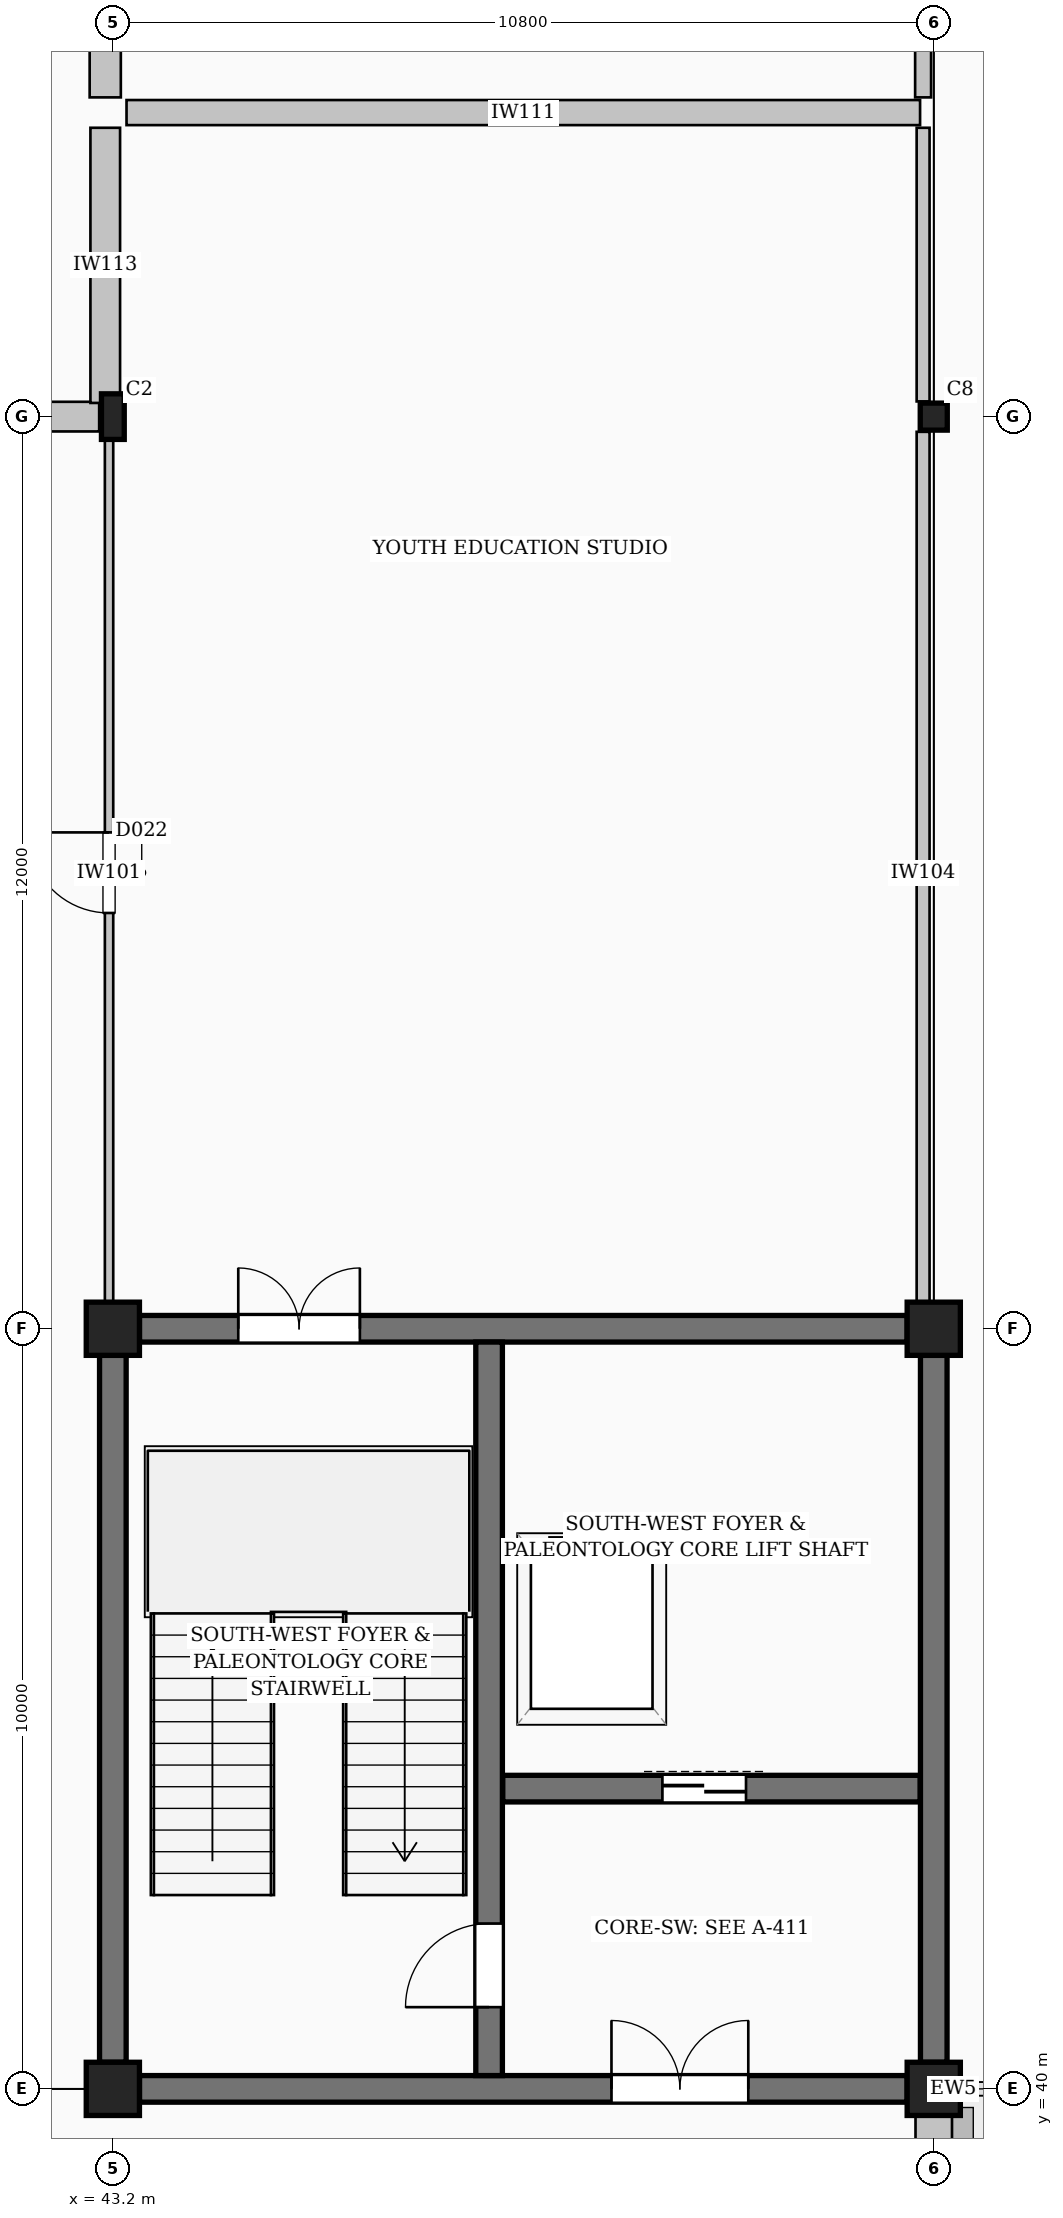
"""IFC4 building model, lengths in metres.
Left out: names, types, materials, properties, quantities, classifications, styles, units other than length and angle.
Written with IfcOpenShell. Run it as: python <this file> out.ifc"""

import sys

from ifc_helpers import new_model, si_unit, direction, frame, frame_2d, origin, origin_2d, place, context, subcontext, project, spatial, rectangle, hollow_circle, i_section, extrude, element, fill, save


model = new_model("IFC4")
c1 = context("Model", 3, precision=1e-05, world=origin(), true_north=direction((0.0, 1.0)))
c2 = subcontext(c1, "Body", "Model", "MODEL_VIEW")
j1 = project(units=[si_unit("LENGTHUNIT", "METRE"), si_unit("PLANEANGLEUNIT", "RADIAN")], contexts=[c1])
p1 = place(None, origin())
s1 = spatial("IfcSite", under=j1, at=p1, CompositionType="ELEMENT")
p2 = place(p1, origin())
s2 = spatial("IfcBuilding", under=s1, at=p2, CompositionType="ELEMENT")
p3 = place(p2, origin())
s3 = spatial("IfcBuildingStorey", under=s2, at=p3, CompositionType="ELEMENT", Elevation=0.0)
for number, where, z_axis, x_axis in (
    (1, (43.2, 40.0, 0.0), (0.0, 0.0, 1.0), (1.0, 0.0, 0.0)),
    (2, (43.2, 50.0, 0.0), (0.0, 0.0, 1.0), (1.0, 0.0, 0.0)),
):
    element("IfcColumn", number, at=place(p3, frame(where, z_axis=z_axis, x_axis=x_axis)), inside=s3, PredefinedType="COLUMN", context=c2, shape_type="SweptSolid", body=[
        extrude(rectangle(XDim=0.7, YDim=0.7, at=origin_2d()), origin(), (0.0, 0.0, 1.0), 4.8),
    ])
p4 = place(p3, frame((43.2, 62.0, 0.0), z_axis=(0.0, 0.0, 1.0), x_axis=(1.0, 0.0, 0.0)))
e3 = element("IfcColumn", 3, at=p4, inside=s3, PredefinedType="COLUMN", context=c2, shape_type="SweptSolid", body=[
    extrude(i_section(OverallWidth=0.3, OverallDepth=0.6, WebThickness=0.015, FlangeThickness=0.03, FilletRadius=0.027, at=origin_2d()), origin(), (0.0, 0.0, 1.0), 4.8),
])
for number, where, z_axis, x_axis in (
    (4, (54.0, 40.0, 0.0), (0.0, 0.0, 1.0), (1.0, 0.0, 0.0)),
    (5, (54.0, 50.0, 0.0), (0.0, 0.0, 1.0), (1.0, 0.0, 0.0)),
):
    element("IfcColumn", number, at=place(p3, frame(where, z_axis=z_axis, x_axis=x_axis)), inside=s3, PredefinedType="COLUMN", context=c2, shape_type="SweptSolid", body=[
        extrude(rectangle(XDim=0.7, YDim=0.7, at=origin_2d()), origin(), (0.0, 0.0, 1.0), 4.8),
    ])
p5 = place(p3, frame((54.0, 62.0, 0.0), z_axis=(0.0, 0.0, 1.0), x_axis=(1.0, 0.0, 0.0)))
e6 = element("IfcColumn", 6, at=p5, inside=s3, PredefinedType="COLUMN", context=c2, shape_type="SweptSolid", body=[
    extrude(hollow_circle(Radius=0.178, WallThickness=0.016, at=origin_2d()), origin(), (0.0, 0.0, 1.0), 4.8),
])
p6 = place(p3, frame((54.0, 30.145, 0.0), z_axis=(0.0, 0.0, 1.0), x_axis=(0.0, 1.0, 0.0)))
e7 = element("IfcWall", 7, at=p6, inside=s3, PredefinedType="STANDARD", context=c2, shape_type="SweptSolid", body=[
    extrude(rectangle(XDim=9.71, YDim=0.48, at=frame_2d((4.855, 0.0))), origin(), (0.0, 0.0, 1.0), 4.56),
])
p7 = place(p6, frame((2.755, 0.0, 0.9)))
e8 = element("IfcOpeningElement", 8, at=p7, cuts=e7, PredefinedType="OPENING", context=c2, shape_type="SweptSolid", body=[
    extrude(rectangle(XDim=4.2, YDim=2.7, at=frame_2d((2.1, 1.35))), frame((0.0, 0.25, 0.0), z_axis=(0.0, -1.0, 0.0), x_axis=(1.0, 0.0, 0.0)), (0.0, 0.0, 1.0), 0.5),
])
p8 = place(p3, frame((54.145, 40.0, 0.0), z_axis=(0.0, 0.0, 1.0), x_axis=(1.0, 0.0, 0.0)))
e9 = element("IfcWall", 9, at=p8, inside=s3, PredefinedType="STANDARD", context=c2, shape_type="SweptSolid", body=[
    extrude(rectangle(XDim=0.225, YDim=0.3, at=frame_2d((0.113, 0.0))), origin(), (0.0, 0.0, 1.0), 4.56),
])
p9 = place(p3, frame((43.55, 40.0, 0.0), z_axis=(0.0, 0.0, 1.0), x_axis=(1.0, 0.0, 0.0)))
e10 = element("IfcWall", 10, at=p9, inside=s3, PredefinedType="SHEAR", context=c2, shape_type="SweptSolid", body=[
    extrude(rectangle(XDim=10.1, YDim=0.35, at=frame_2d((5.05, 0.0))), origin(), (0.0, 0.0, 1.0), 4.56),
])
p10 = place(p9, frame((6.21, 0.0, 0.0)))
e11 = element("IfcOpeningElement", 11, at=p10, cuts=e10, PredefinedType="OPENING", context=c2, shape_type="SweptSolid", body=[
    extrude(rectangle(XDim=1.8, YDim=2.25, at=frame_2d((0.9, 1.125))), frame((0.0, 0.185, 0.0), z_axis=(0.0, -1.0, 0.0), x_axis=(1.0, 0.0, 0.0)), (0.0, 0.0, 1.0), 0.37),
])
p11 = place(p3, frame((43.55, 50.0, 0.0), z_axis=(0.0, 0.0, 1.0), x_axis=(1.0, 0.0, 0.0)))
e12 = element("IfcWall", 12, at=p11, inside=s3, PredefinedType="SHEAR", context=c2, shape_type="SweptSolid", body=[
    extrude(rectangle(XDim=10.1, YDim=0.35, at=frame_2d((5.05, 0.0))), origin(), (0.0, 0.0, 1.0), 4.56),
])
p12 = place(p11, frame((1.3, 0.0, 0.0)))
e13 = element("IfcOpeningElement", 13, at=p12, cuts=e12, PredefinedType="OPENING", context=c2, shape_type="SweptSolid", body=[
    extrude(rectangle(XDim=1.6, YDim=2.2, at=frame_2d((0.8, 1.1))), frame((0.0, 0.185, 0.0), z_axis=(0.0, -1.0, 0.0), x_axis=(1.0, 0.0, 0.0)), (0.0, 0.0, 1.0), 0.37),
])
for number, where, z_axis, x_axis in (
    (14, (43.2, 40.35, 0.0), (0.0, 0.0, 1.0), (0.0, 1.0, 0.0)),
    (15, (54.0, 40.35, 0.0), (0.0, 0.0, 1.0), (0.0, 1.0, 0.0)),
):
    element("IfcWall", number, at=place(p3, frame(where, z_axis=z_axis, x_axis=x_axis)), inside=s3, PredefinedType="SHEAR", context=c2, shape_type="SweptSolid", body=[
        extrude(rectangle(XDim=9.3, YDim=0.35, at=frame_2d((4.65, 0.0))), origin(), (0.0, 0.0, 1.0), 4.56),
    ])
p13 = place(p3, frame((48.15, 40.175, 0.0), z_axis=(0.0, 0.0, 1.0), x_axis=(0.0, 1.0, 0.0)))
e16 = element("IfcWall", 16, at=p13, inside=s3, PredefinedType="SHEAR", context=c2, shape_type="SweptSolid", body=[
    extrude(rectangle(XDim=9.65, YDim=0.35, at=frame_2d((4.825, 0.0))), origin(), (0.0, 0.0, 1.0), 4.56),
])
p14 = place(p13, frame((0.9, 0.0, 0.0)))
e17 = element("IfcOpeningElement", 17, at=p14, cuts=e16, PredefinedType="OPENING", context=c2, shape_type="SweptSolid", body=[
    extrude(rectangle(XDim=1.1, YDim=2.2, at=frame_2d((0.55, 1.1))), frame((0.0, 0.185, 0.0), z_axis=(0.0, -1.0, 0.0), x_axis=(1.0, 0.0, 0.0)), (0.0, 0.0, 1.0), 0.37),
])
p15 = place(p3, frame((48.33, 43.95, 0.0), z_axis=(0.0, 0.0, 1.0), x_axis=(1.0, 0.0, 0.0)))
e18 = element("IfcWall", 18, at=p15, inside=s3, PredefinedType="SHEAR", context=c2, shape_type="SweptSolid", body=[
    extrude(rectangle(XDim=5.49, YDim=0.35, at=frame_2d((2.745, 0.0))), origin(), (0.0, 0.0, 1.0), 4.56),
])
p16 = place(p15, frame((2.1, 0.0, 0.0)))
e19 = element("IfcOpeningElement", 19, at=p16, cuts=e18, PredefinedType="OPENING", context=c2, shape_type="SweptSolid", body=[
    extrude(rectangle(XDim=1.1, YDim=2.2, at=frame_2d((0.55, 1.1))), frame((0.0, 0.185, 0.0), z_axis=(0.0, -1.0, 0.0), x_axis=(1.0, 0.0, 0.0)), (0.0, 0.0, 1.0), 0.37),
])
p17 = place(p3, frame((38.2, 62.0, 0.0), z_axis=(0.0, 0.0, 1.0), x_axis=(1.0, 0.0, 0.0)))
e20 = element("IfcWall", 20, at=p17, inside=s3, PredefinedType="PARTITIONING", context=c2, shape_type="SweptSolid", body=[
    extrude(rectangle(XDim=4.82, YDim=0.39, at=frame_2d((2.41, 0.0))), origin(), (0.0, 0.0, 1.0), 4.049),
])
p18 = place(p17, frame((1.685, 0.0, 0.0)))
e21 = element("IfcOpeningElement", 21, at=p18, cuts=e20, PredefinedType="OPENING", context=c2, shape_type="SweptSolid", body=[
    extrude(rectangle(XDim=1.45, YDim=2.35, at=frame_2d((0.725, 1.175))), frame((0.0, 0.205, 0.0), z_axis=(0.0, -1.0, 0.0), x_axis=(1.0, 0.0, 0.0)), (0.0, 0.0, 1.0), 0.41),
])
p19 = place(p3, frame((43.15, 50.18, 0.0), z_axis=(0.0, 0.0, 1.0), x_axis=(0.0, 1.0, 0.0)))
e22 = element("IfcWall", 22, at=p19, inside=s3, PredefinedType="PARTITIONING", context=c2, shape_type="SweptSolid", body=[
    extrude(rectangle(XDim=11.64, YDim=0.11, at=frame_2d((5.82, 0.0))), origin(), (0.0, 0.0, 1.0), 3.939),
])
p20 = place(p19, frame((5.29, 0.0, 0.0)))
e23 = element("IfcOpeningElement", 23, at=p20, cuts=e22, PredefinedType="OPENING", context=c2, shape_type="SweptSolid", body=[
    extrude(rectangle(XDim=1.06, YDim=2.22, at=frame_2d((0.53, 1.11))), frame((0.0, 0.065, 0.0), z_axis=(0.0, -1.0, 0.0), x_axis=(1.0, 0.0, 0.0)), (0.0, 0.0, 1.0), 0.13),
])
p21 = place(p3, frame((43.38, 66.0, 0.0), z_axis=(0.0, 0.0, 1.0), x_axis=(1.0, 0.0, 0.0)))
e24 = element("IfcWall", 24, at=p21, inside=s3, PredefinedType="PARTITIONING", context=c2, shape_type="SweptSolid", body=[
    extrude(rectangle(XDim=10.44, YDim=0.33, at=frame_2d((5.22, 0.0))), origin(), (0.0, 0.0, 1.0), 4.52),
])
p22 = place(p3, frame((43.1, 62.18, 0.0), z_axis=(0.0, 0.0, 1.0), x_axis=(0.0, 1.0, 0.0)))
e25 = element("IfcWall", 25, at=p22, inside=s3, PredefinedType="PARTITIONING", context=c2, shape_type="SweptSolid", body=[
    extrude(rectangle(XDim=3.62, YDim=0.39, at=frame_2d((1.81, 0.0))), origin(), (0.0, 0.0, 1.0), 4.04),
])
p23 = place(p3, frame((43.1, 66.2, 0.0), z_axis=(0.0, 0.0, 1.0), x_axis=(0.0, 1.0, 0.0)))
e26 = element("IfcWall", 26, at=p23, inside=s3, PredefinedType="PARTITIONING", context=c2, shape_type="SweptSolid", body=[
    extrude(rectangle(XDim=5.6, YDim=0.41, at=frame_2d((2.8, 0.0))), origin(), (0.0, 0.0, 1.0), 4.52),
])
p24 = place(p3, frame((53.86, 50.18, 0.0), z_axis=(0.0, 0.0, 1.0), x_axis=(0.0, 1.0, 0.0)))
e27 = element("IfcWall", 27, at=p24, inside=s3, PredefinedType="PARTITIONING", context=c2, shape_type="SweptSolid", body=[
    extrude(rectangle(XDim=11.62, YDim=0.17, at=frame_2d((5.81, 0.0))), origin(), (0.0, 0.0, 1.0), 4.52),
])
p25 = place(p3, frame((53.86, 62.2, 0.0), z_axis=(0.0, 0.0, 1.0), x_axis=(0.0, 1.0, 0.0)))
e28 = element("IfcWall", 28, at=p25, inside=s3, PredefinedType="PARTITIONING", context=c2, shape_type="SweptSolid", body=[
    extrude(rectangle(XDim=3.6, YDim=0.17, at=frame_2d((1.8, 0.0))), origin(), (0.0, 0.0, 1.0), 4.52),
])
p26 = place(p3, frame((53.86, 66.2, 0.0), z_axis=(0.0, 0.0, 1.0), x_axis=(0.0, 1.0, 0.0)))
e29 = element("IfcWall", 29, at=p26, inside=s3, PredefinedType="PARTITIONING", context=c2, shape_type="SweptSolid", body=[
    extrude(rectangle(XDim=5.6, YDim=0.21, at=frame_2d((2.8, 0.0))), origin(), (0.0, 0.0, 1.0), 4.52),
])
p27 = place(p14, origin())
e30 = element("IfcDoor", 30, at=p27, inside=s3, OperationType="SINGLE_SWING_LEFT", PredefinedType="DOOR", context=c2, shape_type="SweptSolid", body=[
    extrude(rectangle(XDim=1.1, YDim=2.2, at=frame_2d((0.55, 1.1))), frame((0.0, 0.025, 0.0), z_axis=(0.0, -1.0, 0.0), x_axis=(1.0, 0.0, 0.0)), (0.0, 0.0, 1.0), 0.05),
])
fill(e17, e30)
p28 = place(p10, origin())
e31 = element("IfcDoor", 31, at=p28, inside=s3, OperationType="DOUBLE_DOOR_SINGLE_SWING", PredefinedType="DOOR", context=c2, shape_type="SweptSolid", body=[
    extrude(rectangle(XDim=1.8, YDim=2.25, at=frame_2d((0.9, 1.125))), frame((0.0, 0.025, 0.0), z_axis=(0.0, -1.0, 0.0), x_axis=(1.0, 0.0, 0.0)), (0.0, 0.0, 1.0), 0.05),
])
fill(e11, e31)
p29 = place(p12, origin())
e32 = element("IfcDoor", 32, at=p29, inside=s3, OperationType="DOUBLE_DOOR_SINGLE_SWING", PredefinedType="DOOR", context=c2, shape_type="SweptSolid", body=[
    extrude(rectangle(XDim=1.6, YDim=2.2, at=frame_2d((0.8, 1.1))), frame((0.0, 0.025, 0.0), z_axis=(0.0, -1.0, 0.0), x_axis=(1.0, 0.0, 0.0)), (0.0, 0.0, 1.0), 0.05),
])
fill(e13, e32)
p30 = place(p16, origin())
e33 = element("IfcDoor", 33, at=p30, inside=s3, OperationType="DOUBLE_DOOR_SLIDING", PredefinedType="DOOR", context=c2, shape_type="SweptSolid", body=[
    extrude(rectangle(XDim=1.1, YDim=2.2, at=frame_2d((0.55, 1.1))), frame((0.0, 0.025, 0.0), z_axis=(0.0, -1.0, 0.0), x_axis=(1.0, 0.0, 0.0)), (0.0, 0.0, 1.0), 0.05),
])
fill(e19, e33)
p31 = place(p20, origin())
e34 = element("IfcDoor", 34, at=p31, inside=s3, OperationType="SINGLE_SWING_RIGHT", PredefinedType="DOOR", context=c2, shape_type="SweptSolid", body=[
    extrude(rectangle(XDim=1.06, YDim=2.22, at=frame_2d((0.53, 1.11))), frame((0.0, 0.025, 0.0), z_axis=(0.0, -1.0, 0.0), x_axis=(1.0, 0.0, 0.0)), (0.0, 0.0, 1.0), 0.05),
])
fill(e23, e34)
save(model, sys.argv[1])
